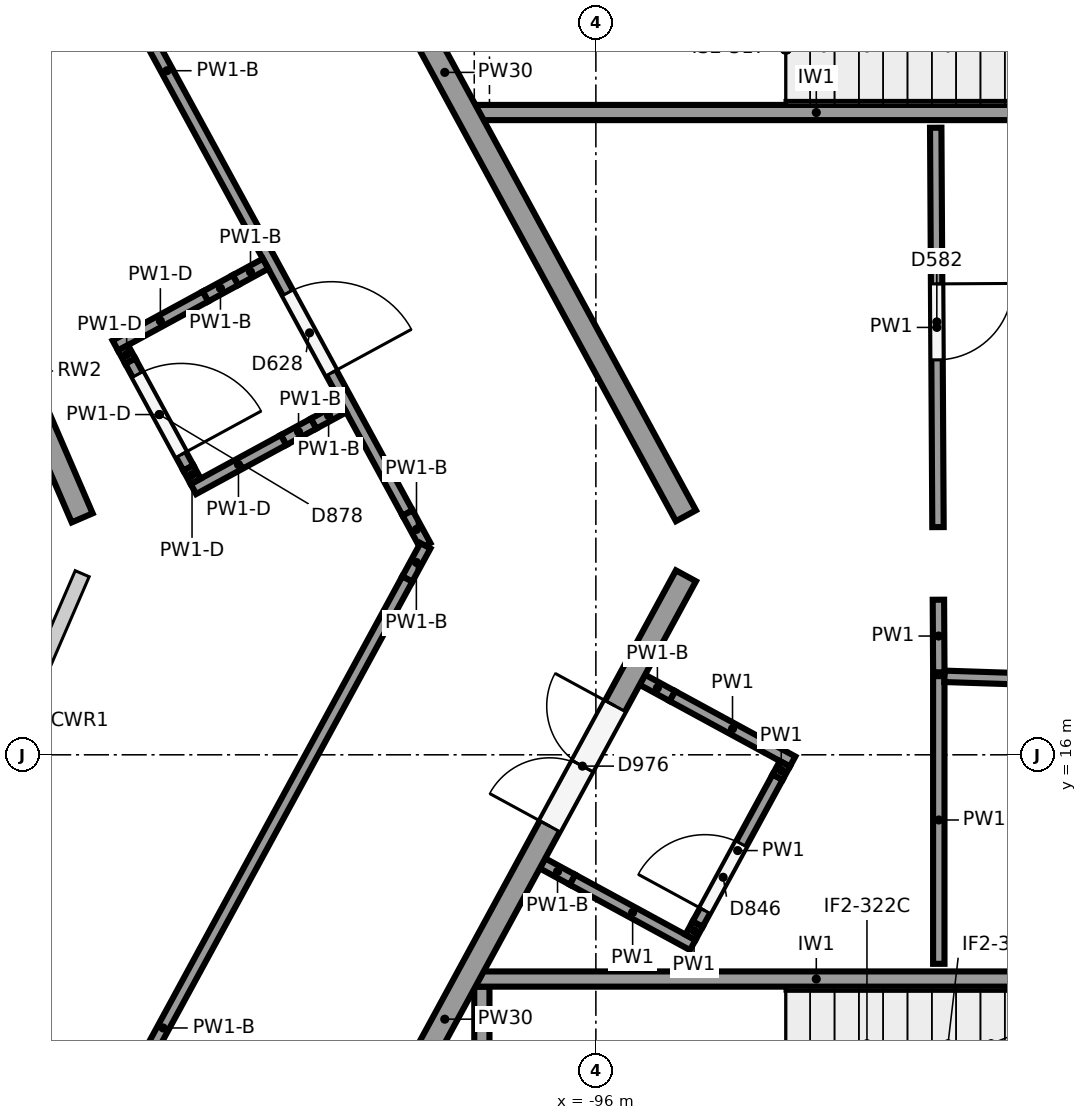
"""IFC4 building model, lengths in metres.
Left out: names, types, materials, properties, quantities, classifications, styles, units other than length and angle.
Written with IfcOpenShell. Run it as: python <this file> out.ifc"""

import sys

from ifc_helpers import new_model, si_unit, direction, frame, frame_2d, origin, origin_2d, place, context, subcontext, project, spatial, rectangle, circle, extrude, element, fill, save


model = new_model("IFC4")
c1 = context("Model", 3, precision=1e-05, world=origin(), true_north=direction((0.0, 1.0)))
c2 = subcontext(c1, "Body", "Model", "MODEL_VIEW")
j1 = project(units=[si_unit("LENGTHUNIT", "METRE"), si_unit("PLANEANGLEUNIT", "RADIAN")], contexts=[c1])
p1 = place(None, origin())
s1 = spatial("IfcSite", under=j1, at=p1, CompositionType="ELEMENT")
p2 = place(p1, origin())
s2 = spatial("IfcBuilding", under=s1, at=p2, CompositionType="ELEMENT")
p3 = place(p2, origin())
s3 = spatial("IfcBuildingStorey", under=s2, at=p3, CompositionType="ELEMENT", Elevation=0.0)
p4 = place(p3, frame((-94.6, 18.75, 0.0), z_axis=(0.0, 0.0, 1.0), x_axis=(1.0, 0.0, 0.0)))
e1 = element("IfcColumn", 1, at=p4, inside=s3, PredefinedType="COLUMN", context=c2, shape_type="SweptSolid", body=[
    extrude(circle(Radius=0.45, at=origin_2d()), origin(), (0.0, 0.0, 1.0), 6.5),
])
for number, where, z_axis, x_axis in (
    (2, (-98.6, 18.75, -0.3), (0.0, 0.0, 1.0), (1.0, 0.0, 0.0)),
    (3, (-102.6, 18.75, -0.3), (0.0, 0.0, 1.0), (1.0, 0.0, 0.0)),
):
    element("IfcColumn", number, at=place(p3, frame(where, z_axis=z_axis, x_axis=x_axis)), inside=s3, PredefinedType="COLUMN", context=c2, shape_type="SweptSolid", body=[
        extrude(circle(Radius=0.4, at=origin_2d()), origin(), (0.0, 0.0, 1.0), 6.8),
    ])
p5 = place(p3, frame((-102.759, 19.117, 0.0), z_axis=(0.0, 0.0, 1.0), x_axis=(-0.396578253752, 0.918000919744, 0.0)))
e4 = element("IfcWall", 4, at=p5, inside=s3, PredefinedType="SOLIDWALL", context=c2, shape_type="SweptSolid", body=[
    extrude(rectangle(XDim=4.208, YDim=0.3, at=frame_2d((2.104, 0.0))), origin(), (0.0, 0.0, 1.0), 4.85),
])
p6 = place(p3, frame((-94.815, 19.145, 0.0), z_axis=(0.0, 0.0, 1.0), x_axis=(-0.477867771117, 0.878431780691, 0.0)))
e5 = element("IfcWall", 5, at=p6, inside=s3, PredefinedType="SOLIDWALL", context=c2, shape_type="SweptSolid", body=[
    extrude(rectangle(XDim=13.28, YDim=0.3, at=frame_2d((6.64, 0.0))), origin(), (0.0, 0.0, 1.0), 4.85),
])
p7 = place(p3, frame((-101.161, 6.689, 0.0), z_axis=(0.0, 0.0, 1.0), x_axis=(0.477867771117, 0.878431780691, 0.0)))
e6 = element("IfcWall", 6, at=p7, inside=s3, PredefinedType="SOLIDWALL", context=c2, shape_type="SweptSolid", body=[
    extrude(rectangle(XDim=13.28, YDim=0.3, at=frame_2d((6.64, 0.0))), origin(), (0.0, 0.0, 1.0), 4.85),
])
p8 = place(p7, frame((9.53, 0.0, 0.0)))
e7 = element("IfcOpeningElement", 7, at=p8, cuts=e6, PredefinedType="OPENING", context=c2, shape_type="SweptSolid", body=[
    extrude(rectangle(XDim=1.8, YDim=2.4, at=frame_2d((0.9, 1.2))), frame((0.0, 0.16, 0.0), z_axis=(0.0, -1.0, 0.0), x_axis=(1.0, 0.0, 0.0)), (0.0, 0.0, 1.0), 0.32),
])
p9 = place(p3, frame((-97.6, 24.45, 0.0), z_axis=(0.0, 0.0, 1.0), x_axis=(1.0, 0.0, 0.0)))
e8 = element("IfcWall", 8, at=p9, inside=s3, PredefinedType="SHEAR", context=c2, shape_type="SweptSolid", body=[
    extrude(rectangle(XDim=9.0, YDim=0.2, at=frame_2d((4.5, 0.0))), origin(), (0.0, 0.0, 1.0), 6.15),
])
p10 = place(p3, frame((-97.5, 31.15, 0.0), z_axis=(0.0, 0.0, 1.0), x_axis=(0.0, -1.0, 0.0)))
e9 = element("IfcWall", 9, at=p10, inside=s3, PredefinedType="SHEAR", context=c2, shape_type="SweptSolid", body=[
    extrude(rectangle(XDim=6.6, YDim=0.2, at=frame_2d((3.3, 0.0))), origin(), (0.0, 0.0, 1.0), 6.15),
])
p11 = place(p3, frame((-97.6, 13.05, 0.0), z_axis=(0.0, 0.0, 1.0), x_axis=(1.0, 0.0, 0.0)))
e10 = element("IfcWall", 10, at=p11, inside=s3, PredefinedType="SHEAR", context=c2, shape_type="SweptSolid", body=[
    extrude(rectangle(XDim=9.0, YDim=0.2, at=frame_2d((4.5, 0.0))), origin(), (0.0, 0.0, 1.0), 6.15),
])
p12 = place(p3, frame((-97.5, 12.95, 0.0), z_axis=(0.0, 0.0, 1.0), x_axis=(0.0, -1.0, 0.0)))
e11 = element("IfcWall", 11, at=p12, inside=s3, PredefinedType="SHEAR", context=c2, shape_type="SweptSolid", body=[
    extrude(rectangle(XDim=6.6, YDim=0.2, at=frame_2d((3.3, 0.0))), origin(), (0.0, 0.0, 1.0), 6.15),
])
p13 = place(p3, frame((-91.488, 13.25, 0.0), z_axis=(0.0, 0.0, 1.0), x_axis=(6.4503644e-05, 0.99999999792, 0.0)))
e12 = element("IfcWall", 12, at=p13, inside=s3, PredefinedType="PARTITIONING", context=c2, shape_type="SweptSolid", body=[
    extrude(rectangle(XDim=3.785, YDim=0.15, at=frame_2d((1.893, 0.0))), origin(), (0.0, 0.0, 1.0), 6.15),
])
p14 = place(p3, frame((-91.413, 17.032, 0.0), z_axis=(0.0, 0.0, 1.0), x_axis=(0.999458991221, -0.032889586018, 0.0)))
e13 = element("IfcWall", 13, at=p14, inside=s3, PredefinedType="PARTITIONING", context=c2, shape_type="SweptSolid", body=[
    extrude(rectangle(XDim=5.716, YDim=0.15, at=frame_2d((2.858, 0.0))), origin(), (0.0, 0.0, 1.0), 6.15),
])
p15 = place(p3, frame((-91.488, 17.085, 0.0), z_axis=(0.0, 0.0, 1.0), x_axis=(-0.005877741553, 0.999982725928, 0.0)))
e14 = element("IfcWall", 14, at=p15, inside=s3, PredefinedType="PARTITIONING", context=c2, shape_type="SweptSolid", body=[
    extrude(rectangle(XDim=0.955, YDim=0.15, at=frame_2d((0.478, 0.0))), origin(), (0.0, 0.0, 1.0), 6.15),
])
p16 = place(p3, frame((-91.529, 24.25, 0.0), z_axis=(0.0, 0.0, 1.0), x_axis=(0.005668527085, -0.999983933771, 0.0)))
e15 = element("IfcWall", 15, at=p16, inside=s3, PredefinedType="PARTITIONING", context=c2, shape_type="SweptSolid", body=[
    extrude(rectangle(XDim=5.254, YDim=0.15, at=frame_2d((2.627, 0.0))), origin(), (0.0, 0.0, 1.0), 6.15),
])
p17 = place(p16, frame((2.054, 0.0, 0.0)))
e16 = element("IfcOpeningElement", 16, at=p17, cuts=e15, PredefinedType="OPENING", context=c2, shape_type="SweptSolid", body=[
    extrude(rectangle(XDim=1.0, YDim=2.1, at=frame_2d((0.5, 1.05))), frame((0.0, 0.085, 0.0), z_axis=(0.0, -1.0, 0.0), x_axis=(1.0, 0.0, 0.0)), (0.0, 0.0, 1.0), 0.17),
])
p18 = place(p3, frame((-104.808, 30.819, 0.0), z_axis=(0.0, 0.0, 1.0), x_axis=(0.477860264875, -0.878435864052, 0.0)))
e17 = element("IfcWall", 17, at=p18, inside=s3, PredefinedType="PARTITIONING", context=c2, shape_type="SweptSolid", body=[
    extrude(rectangle(XDim=13.249, YDim=0.15, at=frame_2d((6.625, 0.0))), origin(), (0.0, 0.0, 1.0), 4.85),
])
p19 = place(p18, frame((9.95, 0.0, 0.0)))
e18 = element("IfcOpeningElement", 18, at=p19, cuts=e17, PredefinedType="OPENING", context=c2, shape_type="SweptSolid", body=[
    extrude(rectangle(XDim=1.2, YDim=2.1, at=frame_2d((0.6, 1.05))), frame((0.0, 0.085, 0.0), z_axis=(0.0, -1.0, 0.0), x_axis=(1.0, 0.0, 0.0)), (0.0, 0.0, 1.0), 0.17),
])
p20 = place(p3, frame((-98.477, 19.181, 0.0), z_axis=(0.0, 0.0, 1.0), x_axis=(0.477805639801, -0.878465577342, 0.0)))
e19 = element("IfcWall", 19, at=p20, inside=s3, PredefinedType="PARTITIONING", context=c2, shape_type="SweptSolid", body=[
    extrude(rectangle(XDim=0.49, YDim=0.15, at=frame_2d((0.245, 0.0))), origin(), (0.0, 0.0, 1.0), 4.85),
])
p21 = place(p3, frame((-98.243, 18.75, 0.0), z_axis=(0.0, 0.0, 1.0), x_axis=(-0.477924582155, -0.878400873048, 0.0)))
e20 = element("IfcWall", 20, at=p21, inside=s3, PredefinedType="PARTITIONING", context=c2, shape_type="SweptSolid", body=[
    extrude(rectangle(XDim=0.498, YDim=0.15, at=frame_2d((0.249, 0.0))), origin(), (0.0, 0.0, 1.0), 4.85),
])
p22 = place(p3, frame((-98.481, 18.312, 0.0), z_axis=(0.0, 0.0, 1.0), x_axis=(-0.47786854719, -0.878431358506, 0.0)))
e21 = element("IfcWall", 21, at=p22, inside=s3, PredefinedType="PARTITIONING", context=c2, shape_type="SweptSolid", body=[
    extrude(rectangle(XDim=13.447, YDim=0.15, at=frame_2d((6.724, 0.0))), origin(), (0.0, 0.0, 1.0), 4.85),
])
p23 = place(p3, frame((-96.702, 14.572, 0.0), z_axis=(0.0, 0.0, 1.0), x_axis=(0.878372019733, -0.477977609256, 0.0)))
e22 = element("IfcWall", 22, at=p23, inside=s3, PredefinedType="PARTITIONING", context=c2, shape_type="SweptSolid", body=[
    extrude(rectangle(XDim=0.45, YDim=0.15, at=frame_2d((0.225, 0.0))), origin(), (0.0, 0.0, 1.0), 4.85),
])
p24 = place(p3, frame((-96.307, 14.357, 0.0), z_axis=(0.0, 0.0, 1.0), x_axis=(0.878428962466, -0.477872951632, 0.0)))
e23 = element("IfcWall", 23, at=p24, inside=s3, PredefinedType="PARTITIONING", context=c2, shape_type="SweptSolid", body=[
    extrude(rectangle(XDim=1.8, YDim=0.15, at=frame_2d((0.9, 0.0))), origin(), (0.0, 0.0, 1.0), 6.15),
])
p25 = place(p3, frame((-95.388, 16.987, 0.0), z_axis=(0.0, 0.0, 1.0), x_axis=(0.878372019733, -0.477977609256, 0.0)))
e24 = element("IfcWall", 24, at=p25, inside=s3, PredefinedType="PARTITIONING", context=c2, shape_type="SweptSolid", body=[
    extrude(rectangle(XDim=0.45, YDim=0.15, at=frame_2d((0.225, 0.0))), origin(), (0.0, 0.0, 1.0), 4.85),
])
p26 = place(p3, frame((-94.993, 16.772, 0.0), z_axis=(0.0, 0.0, 1.0), x_axis=(0.878459932885, -0.477816017223, 0.0)))
e25 = element("IfcWall", 25, at=p26, inside=s3, PredefinedType="PARTITIONING", context=c2, shape_type="SweptSolid", body=[
    extrude(rectangle(XDim=1.8, YDim=0.15, at=frame_2d((0.9, 0.0))), origin(), (0.0, 0.0, 1.0), 6.15),
])
p27 = place(p3, frame((-94.756, 13.598, 0.0), z_axis=(0.0, 0.0, 1.0), x_axis=(0.478168266369, 0.878268244352, 0.0)))
e26 = element("IfcWall", 26, at=p27, inside=s3, PredefinedType="PARTITIONING", context=c2, shape_type="SweptSolid", body=[
    extrude(rectangle(XDim=0.2, YDim=0.15, at=frame_2d((0.1, 0.0))), origin(), (0.0, 0.0, 1.0), 6.15),
])
p28 = place(p3, frame((-94.66, 13.774, 0.0), z_axis=(0.0, 0.0, 1.0), x_axis=(0.477887643273, 0.878420969927, 0.0)))
e27 = element("IfcWall", 27, at=p28, inside=s3, PredefinedType="PARTITIONING", context=c2, shape_type="SweptSolid", body=[
    extrude(rectangle(XDim=2.2, YDim=0.15, at=frame_2d((1.1, 0.0))), origin(), (0.0, 0.0, 1.0), 6.15),
])
p29 = place(p28, frame((0.2, 0.0, 0.0)))
e28 = element("IfcOpeningElement", 28, at=p29, cuts=e27, PredefinedType="OPENING", context=c2, shape_type="SweptSolid", body=[
    extrude(rectangle(XDim=1.0, YDim=2.1, at=frame_2d((0.5, 1.05))), frame((0.0, 0.085, 0.0), z_axis=(0.0, -1.0, 0.0), x_axis=(1.0, 0.0, 0.0)), (0.0, 0.0, 1.0), 0.17),
])
p30 = place(p3, frame((-93.609, 15.706, 0.0), z_axis=(0.0, 0.0, 1.0), x_axis=(0.477226530971, 0.878780312785, 0.0)))
e29 = element("IfcWall", 29, at=p30, inside=s3, PredefinedType="PARTITIONING", context=c2, shape_type="SweptSolid", body=[
    extrude(rectangle(XDim=0.2, YDim=0.15, at=frame_2d((0.1, 0.0))), origin(), (0.0, 0.0, 1.0), 6.15),
])
p31 = place(p3, frame((-100.346, 22.46, 0.0), z_axis=(0.0, 0.0, 1.0), x_axis=(-0.878599760102, -0.477558856633, 0.0)))
e30 = element("IfcWall", 30, at=p31, inside=s3, PredefinedType="PARTITIONING", context=c2, shape_type="SweptSolid", body=[
    extrude(rectangle(XDim=0.45, YDim=0.15, at=frame_2d((0.225, 0.0))), origin(), (0.0, 0.0, 1.0), 4.85),
])
p32 = place(p3, frame((-100.742, 22.245, 0.0), z_axis=(0.0, 0.0, 1.0), x_axis=(-0.878268244352, -0.478168266369, 0.0)))
e31 = element("IfcWall", 31, at=p32, inside=s3, PredefinedType="PARTITIONING", context=c2, shape_type="SweptSolid", body=[
    extrude(rectangle(XDim=0.45, YDim=0.15, at=frame_2d((0.225, 0.0))), origin(), (0.0, 0.0, 1.0), 4.85),
])
p33 = place(p3, frame((-101.137, 22.03, 0.0), z_axis=(0.0, 0.0, 1.0), x_axis=(-0.878447942246, -0.477838061234, 0.0)))
e32 = element("IfcWall", 32, at=p33, inside=s3, PredefinedType="PARTITIONING", context=c2, shape_type="SweptSolid", body=[
    extrude(rectangle(XDim=1.35, YDim=0.15, at=frame_2d((0.675, 0.0))), origin(), (0.0, 0.0, 1.0), 6.1),
])
for number, where, z_axis, x_axis in (
    (33, (-99.319, 20.571, 0.0), (0.0, 0.0, 1.0), (-0.879, -0.478, 0.0)),
    (34, (-99.714, 20.356, 0.0), (0.0, 0.0, 1.0), (-0.878, -0.478, 0.0)),
):
    element("IfcWall", number, at=place(p3, frame(where, z_axis=z_axis, x_axis=x_axis)), inside=s3, PredefinedType="PARTITIONING", context=c2, shape_type="SweptSolid", body=[
        extrude(rectangle(XDim=0.45, YDim=0.15, at=frame_2d((0.225, 0.0))), origin(), (0.0, 0.0, 1.0), 4.85),
    ])
p34 = place(p3, frame((-100.11, 20.141, 0.0), z_axis=(0.0, 0.0, 1.0), x_axis=(-0.878372019733, -0.477977609256, 0.0)))
e35 = element("IfcWall", 35, at=p34, inside=s3, PredefinedType="PARTITIONING", context=c2, shape_type="SweptSolid", body=[
    extrude(rectangle(XDim=1.35, YDim=0.15, at=frame_2d((0.675, 0.0))), origin(), (0.0, 0.0, 1.0), 6.1),
])
p35 = place(p3, frame((-102.221, 21.355, 0.0), z_axis=(0.0, 0.0, 1.0), x_axis=(0.477738861158, -0.878501895581, 0.0)))
e36 = element("IfcWall", 36, at=p35, inside=s3, PredefinedType="PARTITIONING", context=c2, shape_type="SweptSolid", body=[
    extrude(rectangle(XDim=0.2, YDim=0.15, at=frame_2d((0.1, 0.0))), origin(), (0.0, 0.0, 1.0), 6.1),
])
p36 = place(p3, frame((-102.126, 21.179, 0.0), z_axis=(0.0, 0.0, 1.0), x_axis=(0.477889696038, -0.878419853157, 0.0)))
e37 = element("IfcWall", 37, at=p36, inside=s3, PredefinedType="PARTITIONING", context=c2, shape_type="SweptSolid", body=[
    extrude(rectangle(XDim=1.6, YDim=0.15, at=frame_2d((0.8, 0.0))), origin(), (0.0, 0.0, 1.0), 6.1),
])
p37 = place(p36, frame((0.2, 0.0, 0.0)))
e38 = element("IfcOpeningElement", 38, at=p37, cuts=e37, PredefinedType="OPENING", context=c2, shape_type="SweptSolid", body=[
    extrude(rectangle(XDim=1.2, YDim=2.1, at=frame_2d((0.6, 1.05))), frame((0.0, 0.085, 0.0), z_axis=(0.0, -1.0, 0.0), x_axis=(1.0, 0.0, 0.0)), (0.0, 0.0, 1.0), 0.17),
])
p38 = place(p3, frame((-101.361, 19.774, 0.0), z_axis=(0.0, 0.0, 1.0), x_axis=(0.478168266369, -0.878268244352, 0.0)))
e39 = element("IfcWall", 39, at=p38, inside=s3, PredefinedType="PARTITIONING", context=c2, shape_type="SweptSolid", body=[
    extrude(rectangle(XDim=0.2, YDim=0.15, at=frame_2d((0.1, 0.0))), origin(), (0.0, 0.0, 1.0), 6.1),
])
p39 = place(p8, origin())
e40 = element("IfcDoor", 40, at=p39, inside=s3, OperationType="DOUBLE_DOOR_SINGLE_SWING", PredefinedType="DOOR", context=c2, shape_type="SweptSolid", body=[
    extrude(rectangle(XDim=1.8, YDim=2.4, at=frame_2d((0.9, 1.2))), frame((0.0, 0.025, 0.0), z_axis=(0.0, -1.0, 0.0), x_axis=(1.0, 0.0, 0.0)), (0.0, 0.0, 1.0), 0.05),
])
fill(e7, e40)
p40 = place(p17, origin())
e41 = element("IfcDoor", 41, at=p40, inside=s3, OperationType="SINGLE_SWING_LEFT", PredefinedType="DOOR", context=c2, shape_type="SweptSolid", body=[
    extrude(rectangle(XDim=1.0, YDim=2.1, at=frame_2d((0.5, 1.05))), frame((0.0, 0.025, 0.0), z_axis=(0.0, -1.0, 0.0), x_axis=(1.0, 0.0, 0.0)), (0.0, 0.0, 1.0), 0.05),
])
fill(e16, e41)
p41 = place(p19, origin())
e42 = element("IfcDoor", 42, at=p41, inside=s3, OperationType="SINGLE_SWING_RIGHT", PredefinedType="DOOR", context=c2, shape_type="SweptSolid", body=[
    extrude(rectangle(XDim=1.2, YDim=2.1, at=frame_2d((0.6, 1.05))), frame((0.0, 0.025, 0.0), z_axis=(0.0, -1.0, 0.0), x_axis=(1.0, 0.0, 0.0)), (0.0, 0.0, 1.0), 0.05),
])
fill(e18, e42)
p42 = place(p29, origin())
e43 = element("IfcDoor", 43, at=p42, inside=s3, OperationType="SINGLE_SWING_LEFT", PredefinedType="DOOR", context=c2, shape_type="SweptSolid", body=[
    extrude(rectangle(XDim=1.0, YDim=2.1, at=frame_2d((0.5, 1.05))), frame((0.0, 0.025, 0.0), z_axis=(0.0, -1.0, 0.0), x_axis=(1.0, 0.0, 0.0)), (0.0, 0.0, 1.0), 0.05),
])
fill(e28, e43)
p43 = place(p37, origin())
e44 = element("IfcDoor", 44, at=p43, inside=s3, OperationType="SINGLE_SWING_RIGHT", PredefinedType="DOOR", context=c2, shape_type="SweptSolid", body=[
    extrude(rectangle(XDim=1.2, YDim=2.1, at=frame_2d((0.6, 1.05))), frame((0.0, 0.025, 0.0), z_axis=(0.0, -1.0, 0.0), x_axis=(1.0, 0.0, 0.0)), (0.0, 0.0, 1.0), 0.05),
])
fill(e38, e44)
save(model, sys.argv[1])
